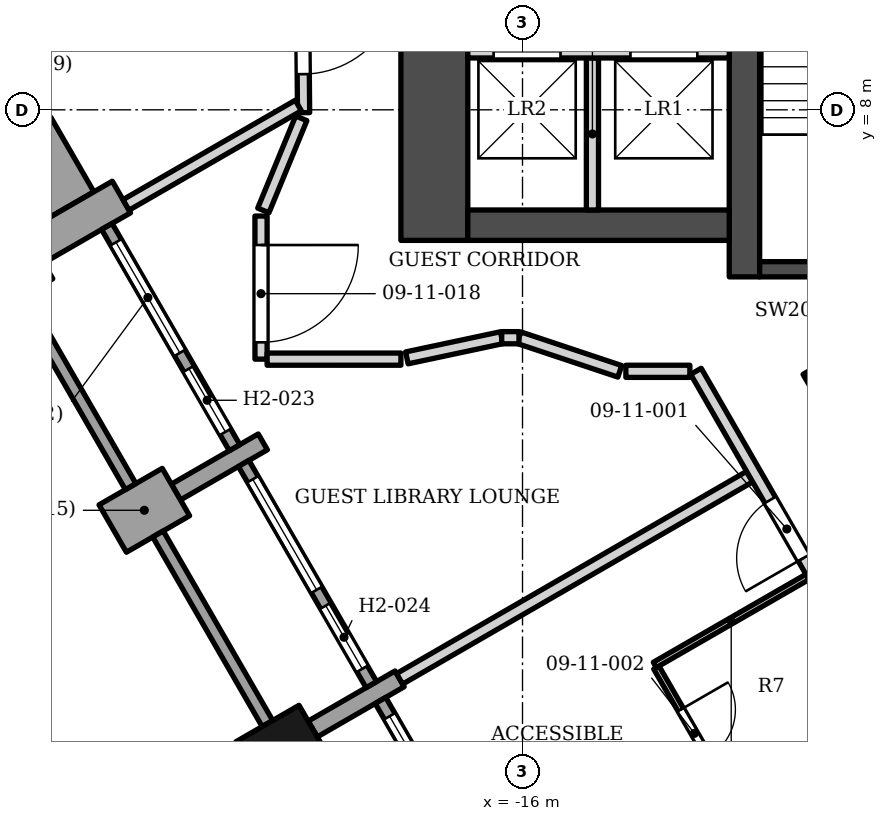
"""IFC4 building model, lengths in metres.
Left out: names, types, materials, properties, quantities, classifications, styles, units other than length and angle.
Written with IfcOpenShell. Run it as: python <this file> out.ifc"""

import sys

from ifc_helpers import new_model, si_unit, direction, frame, frame_2d, origin, origin_2d, place, context, subcontext, project, spatial, rectangle, extrude, element, fill, save


model = new_model("IFC4")
c1 = context("Model", 3, precision=1e-05, world=origin(), true_north=direction((0.0, 1.0)))
c2 = subcontext(c1, "Body", "Model", "MODEL_VIEW")
j1 = project(units=[si_unit("LENGTHUNIT", "METRE"), si_unit("PLANEANGLEUNIT", "RADIAN")], contexts=[c1])
p1 = place(None, origin())
s1 = spatial("IfcSite", under=j1, at=p1, CompositionType="ELEMENT")
p2 = place(p1, origin())
s2 = spatial("IfcBuilding", under=s1, at=p2, CompositionType="ELEMENT")
p3 = place(p2, frame((0.0, 0.0, 56.2)))
s3 = spatial("IfcBuildingStorey", under=s2, at=p3, CompositionType="ELEMENT", Elevation=56.2)
p4 = place(p3, frame((-12.35, 5.253, 0.0), z_axis=(0.0, 0.0, 1.0), x_axis=(0.0, 1.0, 0.0)))
e1 = element("IfcWall", 1, at=p4, inside=s3, PredefinedType="SHEAR", context=c2, shape_type="SweptSolid", body=[
    extrude(rectangle(XDim=13.3, YDim=0.5, at=frame_2d((6.65, 0.0))), origin(), (0.0, 0.0, 1.0), 3.4),
])
p5 = place(p3, frame((-12.1, 5.378, 0.0), z_axis=(0.0, 0.0, 1.0), x_axis=(1.0, 0.0, 0.0)))
e2 = element("IfcWall", 2, at=p5, inside=s3, PredefinedType="SHEAR", context=c2, shape_type="SweptSolid", body=[
    extrude(rectangle(XDim=3.75, YDim=0.25, at=frame_2d((1.875, 0.0))), origin(), (0.0, 0.0, 1.0), 3.4),
])
p6 = place(p3, frame((-12.6, 6.103, 0.0), z_axis=(0.0, 0.0, 1.0), x_axis=(-1.0, 0.0, 0.0)))
e3 = element("IfcWall", 3, at=p6, inside=s3, PredefinedType="SHEAR", context=c2, shape_type="SweptSolid", body=[
    extrude(rectangle(XDim=4.3, YDim=0.5, at=frame_2d((2.15, 0.0))), origin(), (0.0, 0.0, 1.0), 3.4),
])
p7 = place(p3, frame((-17.45, 5.853, 0.0), z_axis=(0.0, 0.0, 1.0), x_axis=(0.0, 1.0, 0.0)))
e4 = element("IfcWall", 4, at=p7, inside=s3, PredefinedType="SHEAR", context=c2, shape_type="SweptSolid", body=[
    extrude(rectangle(XDim=13.2, YDim=1.1, at=frame_2d((6.6, 0.0))), origin(), (0.0, 0.0, 1.0), 3.4),
])
p8 = place(p7, frame((4.1, 0.0, 0.0)))
e5 = element("IfcOpeningElement", 5, at=p8, cuts=e4, PredefinedType="OPENING", context=c2, shape_type="SweptSolid", body=[
    extrude(rectangle(XDim=1.6, YDim=2.1, at=frame_2d((0.8, 1.05))), frame((0.0, 0.56, 0.0), z_axis=(0.0, -1.0, 0.0), x_axis=(1.0, 0.0, 0.0)), (0.0, 0.0, 1.0), 1.12),
])
p9 = place(p7, frame((9.75, 0.0, 0.0)))
e6 = element("IfcOpeningElement", 6, at=p9, cuts=e4, PredefinedType="OPENING", context=c2, shape_type="SweptSolid", body=[
    extrude(rectangle(XDim=0.9, YDim=2.1, at=frame_2d((0.45, 1.05))), frame((0.0, 0.56, 0.0), z_axis=(0.0, -1.0, 0.0), x_axis=(1.0, 0.0, 0.0)), (0.0, 0.0, 1.0), 1.12),
])
for number, where, z_axis, x_axis in (
    (7, (-24.47, 5.311, 0.0), (0.0, 0.0, 1.0), (0.5, -0.866, 0.0)),
    (8, (-19.97, -2.483, 0.0), (0.0, 0.0, 1.0), (0.5, -0.866, 0.0)),
):
    element("IfcColumn", number, at=place(p3, frame(where, z_axis=z_axis, x_axis=x_axis)), inside=s3, PredefinedType="COLUMN", context=c2, shape_type="SweptSolid", body=[
        extrude(rectangle(XDim=0.9, YDim=1.2, at=origin_2d()), origin(), (0.0, 0.0, 1.0), 3.4),
    ])
p10 = place(p3, frame((-22.596, 6.566, 0.0), z_axis=(0.0, 0.0, 1.0), x_axis=(-0.866040211805, -0.499974350878, 0.0)))
e9 = element("IfcWall", 9, at=p10, inside=s3, PredefinedType="SOLIDWALL", context=c2, shape_type="SweptSolid", body=[
    extrude(rectangle(XDim=1.65, YDim=0.6, at=frame_2d((0.825, 0.0))), origin(), (0.0, 0.0, 1.0), 2.45),
])
p11 = place(p3, frame((-22.739, 1.114, 0.0), z_axis=(0.0, 0.0, 1.0), x_axis=(0.866043267704, 0.499969057507, 0.0)))
e10 = element("IfcWall", 10, at=p11, inside=s3, PredefinedType="SOLIDWALL", context=c2, shape_type="SweptSolid", body=[
    extrude(rectangle(XDim=1.2, YDim=0.9, at=frame_2d((0.6, 0.0))), origin(), (0.0, 0.0, 1.0), 2.63),
])
p12 = place(p3, frame((-20.271, 2.539, 0.0), z_axis=(0.0, 0.0, 1.0), x_axis=(-0.865976140824, -0.500085316245, 0.0)))
e11 = element("IfcWall", 11, at=p12, inside=s3, PredefinedType="SOLIDWALL", context=c2, shape_type="SweptSolid", body=[
    extrude(rectangle(XDim=1.65, YDim=0.3, at=frame_2d((0.825, 0.0))), origin(), (0.0, 0.0, 1.0), 2.65),
])
p13 = place(p3, frame((-18.021, -1.358, 0.0), z_axis=(0.0, 0.0, 1.0), x_axis=(-0.866040211805, -0.499974350878, 0.0)))
e12 = element("IfcWall", 12, at=p13, inside=s3, PredefinedType="SOLIDWALL", context=c2, shape_type="SweptSolid", body=[
    extrude(rectangle(XDim=1.65, YDim=0.3, at=frame_2d((0.825, 0.0))), origin(), (0.0, 0.0, 1.0), 2.628),
])
p14 = place(p3, frame((-24.245, 4.921, 0.0), z_axis=(0.0, 0.0, 1.0), x_axis=(0.499961193289, -0.866047807691, 0.0)))
e13 = element("IfcWall", 13, at=p14, inside=s3, PredefinedType="SOLIDWALL", context=c2, shape_type="SweptSolid", body=[
    extrude(rectangle(XDim=3.6, YDim=0.2, at=frame_2d((1.8, 0.0))), origin(), (0.0, 0.0, 1.0), 2.63),
])
p15 = place(p3, frame((-22.836, 6.081, 0.0), z_axis=(0.0, 0.0, 1.0), x_axis=(0.500002543286, -0.866023935413, 0.0)))
e14 = element("IfcWall", 14, at=p15, inside=s3, PredefinedType="ELEMENTEDWALL", context=c2, shape_type="SweptSolid", body=[
    extrude(rectangle(XDim=4.2, YDim=0.2, at=frame_2d((2.1, 0.0))), origin(), (0.0, 0.0, 1.0), 2.45),
])
p16 = place(p15, frame((0.3, 0.0, 0.6)))
e15 = element("IfcOpeningElement", 15, at=p16, cuts=e14, PredefinedType="OPENING", context=c2, shape_type="SweptSolid", body=[
    extrude(rectangle(XDim=2.1, YDim=1.75, at=frame_2d((1.05, 0.875))), frame((0.0, 0.11, 0.0), z_axis=(0.0, -1.0, 0.0), x_axis=(1.0, 0.0, 0.0)), (0.0, 0.0, 1.0), 0.22),
])
p17 = place(p15, frame((2.7, 0.0, 0.0)))
e16 = element("IfcOpeningElement", 16, at=p17, cuts=e14, PredefinedType="OPENING", context=c2, shape_type="SweptSolid", body=[
    extrude(rectangle(XDim=1.2, YDim=2.35, at=frame_2d((0.6, 1.175))), frame((0.0, 0.11, 0.0), z_axis=(0.0, -1.0, 0.0), x_axis=(1.0, 0.0, 0.0)), (0.0, 0.0, 1.0), 0.22),
])
p18 = place(p3, frame((-21.995, 1.024, 0.0), z_axis=(0.0, 0.0, 1.0), x_axis=(0.499961193289, -0.866047807691, 0.0)))
e17 = element("IfcWall", 17, at=p18, inside=s3, PredefinedType="SOLIDWALL", context=c2, shape_type="SweptSolid", body=[
    extrude(rectangle(XDim=3.6, YDim=0.2, at=frame_2d((1.8, 0.0))), origin(), (0.0, 0.0, 1.0), 2.63),
])
p19 = place(p3, frame((-20.586, 2.184, 0.0), z_axis=(0.0, 0.0, 1.0), x_axis=(0.500027713859, -0.866009402589, 0.0)))
e18 = element("IfcWall", 18, at=p19, inside=s3, PredefinedType="ELEMENTEDWALL", context=c2, shape_type="SweptSolid", body=[
    extrude(rectangle(XDim=4.2, YDim=0.2, at=frame_2d((2.1, 0.0))), origin(), (0.0, 0.0, 1.0), 2.65),
])
p20 = place(p19, frame((0.3, 0.0, 0.6)))
e19 = element("IfcOpeningElement", 19, at=p20, cuts=e18, PredefinedType="OPENING", context=c2, shape_type="SweptSolid", body=[
    extrude(rectangle(XDim=2.1, YDim=1.8, at=frame_2d((1.05, 0.9))), frame((0.0, 0.11, 0.0), z_axis=(0.0, -1.0, 0.0), x_axis=(1.0, 0.0, 0.0)), (0.0, 0.0, 1.0), 0.22),
])
p21 = place(p19, frame((2.7, 0.0, 0.0)))
e20 = element("IfcOpeningElement", 20, at=p21, cuts=e18, PredefinedType="OPENING", context=c2, shape_type="SweptSolid", body=[
    extrude(rectangle(XDim=1.2, YDim=2.4, at=frame_2d((0.6, 1.2))), frame((0.0, 0.11, 0.0), z_axis=(0.0, -1.0, 0.0), x_axis=(1.0, 0.0, 0.0)), (0.0, 0.0, 1.0), 0.22),
])
p22 = place(p3, frame((-18.336, -1.713, 0.0), z_axis=(0.0, 0.0, 1.0), x_axis=(0.500027713859, -0.866009402589, 0.0)))
e21 = element("IfcWall", 21, at=p22, inside=s3, PredefinedType="ELEMENTEDWALL", context=c2, shape_type="SweptSolid", body=[
    extrude(rectangle(XDim=4.2, YDim=0.2, at=frame_2d((2.1, 0.0))), origin(), (0.0, 0.0, 1.0), 2.628),
])
p23 = place(p22, frame((0.3, 0.0, 0.6)))
e22 = element("IfcOpeningElement", 22, at=p23, cuts=e21, PredefinedType="OPENING", context=c2, shape_type="SweptSolid", body=[
    extrude(rectangle(XDim=2.1, YDim=1.8, at=frame_2d((1.05, 0.9))), frame((0.0, 0.11, 0.0), z_axis=(0.0, -1.0, 0.0), x_axis=(1.0, 0.0, 0.0)), (0.0, 0.0, 1.0), 0.22),
])
p24 = place(p22, frame((2.7, 0.0, 0.0)))
e23 = element("IfcOpeningElement", 23, at=p24, cuts=e21, PredefinedType="OPENING", context=c2, shape_type="SweptSolid", body=[
    extrude(rectangle(XDim=1.2, YDim=2.4, at=frame_2d((0.6, 1.2))), frame((0.0, 0.11, 0.0), z_axis=(0.0, -1.0, 0.0), x_axis=(1.0, 0.0, 0.0)), (0.0, 0.0, 1.0), 0.22),
])
p25 = place(p3, frame((-25.569, 6.014, 0.0), z_axis=(0.0, 0.0, 1.0), x_axis=(0.866022959057, 0.500004234368, 0.0)))
e24 = element("IfcWall", 24, at=p25, inside=s3, PredefinedType="SOLIDWALL", context=c2, shape_type="SweptSolid", body=[
    extrude(rectangle(XDim=2.5, YDim=1.417, at=frame_2d((1.25, 0.0))), origin(), (0.0, 0.0, 1.0), 2.63),
])
p26 = place(p3, frame((-14.85, 6.353, 0.0), z_axis=(0.0, 0.0, 1.0), x_axis=(0.0, 1.0, 0.0)))
e25 = element("IfcWall", 25, at=p26, inside=s3, PredefinedType="SOLIDWALL", context=c2, shape_type="SweptSolid", body=[
    extrude(rectangle(XDim=2.5, YDim=0.2, at=frame_2d((1.25, 0.0))), origin(), (0.0, 0.0, 1.0), 3.23),
])
p27 = place(p3, frame((-16.9, 8.953, 0.0), z_axis=(0.0, 0.0, 1.0), x_axis=(1.0, 0.0, 0.0)))
e26 = element("IfcWall", 26, at=p27, inside=s3, PredefinedType="SOLIDWALL", context=c2, shape_type="SweptSolid", body=[
    extrude(rectangle(XDim=4.3, YDim=0.2, at=frame_2d((2.15, 0.0))), origin(), (0.0, 0.0, 1.0), 3.23),
])
p28 = place(p27, frame((2.675, 0.0, 0.0)))
e27 = element("IfcOpeningElement", 27, at=p28, cuts=e26, PredefinedType="OPENING", context=c2, shape_type="SweptSolid", body=[
    extrude(rectangle(XDim=1.1, YDim=2.1, at=frame_2d((0.55, 1.05))), frame((0.0, 0.11, 0.0), z_axis=(0.0, -1.0, 0.0), x_axis=(1.0, 0.0, 0.0)), (0.0, 0.0, 1.0), 0.22),
])
p29 = place(p27, frame((0.425, 0.0, 0.0)))
e28 = element("IfcOpeningElement", 28, at=p29, cuts=e26, PredefinedType="OPENING", context=c2, shape_type="SweptSolid", body=[
    extrude(rectangle(XDim=1.1, YDim=2.1, at=frame_2d((0.55, 1.05))), frame((0.0, 0.11, 0.0), z_axis=(0.0, -1.0, 0.0), x_axis=(1.0, 0.0, 0.0)), (0.0, 0.0, 1.0), 0.22),
])
p30 = place(p3, frame((-15.771, -5.255, 0.0), z_axis=(0.0, 0.0, 1.0), x_axis=(0.866166026107, 0.499756355856, 0.0)))
e29 = element("IfcWall", 29, at=p30, inside=s3, PredefinedType="PARTITIONING", context=c2, shape_type="SweptSolid", body=[
    extrude(rectangle(XDim=6.65, YDim=0.2, at=frame_2d((3.325, 0.0))), origin(), (0.0, 0.0, 1.0), 2.384),
])
p31 = place(p3, frame((-18.021, -1.358, 0.0), z_axis=(0.0, 0.0, 1.0), x_axis=(0.865919508558, 0.500183371074, 0.0)))
e30 = element("IfcWall", 30, at=p31, inside=s3, PredefinedType="PARTITIONING", context=c2, shape_type="SweptSolid", body=[
    extrude(rectangle(XDim=6.648, YDim=0.2, at=frame_2d((3.324, 0.0))), origin(), (0.0, 0.0, 1.0), 2.384),
])
p32 = place(p3, frame((-13.799, -1.172, 0.0), z_axis=(0.0, 0.0, 1.0), x_axis=(0.500018594424, -0.866014668023, 0.0)))
e31 = element("IfcWall", 31, at=p32, inside=s3, PredefinedType="PARTITIONING", context=c2, shape_type="SweptSolid", body=[
    extrude(rectangle(XDim=2.45, YDim=0.1, at=frame_2d((1.225, 0.0))), origin(), (0.0, 0.0, 1.0), 2.384),
])
p33 = place(p32, frame((0.8, 0.0, 0.0)))
e32 = element("IfcOpeningElement", 32, at=p33, cuts=e31, PredefinedType="OPENING", context=c2, shape_type="SweptSolid", body=[
    extrude(rectangle(XDim=0.9, YDim=2.1, at=frame_2d((0.45, 1.05))), frame((0.0, 0.06, 0.0), z_axis=(0.0, -1.0, 0.0), x_axis=(1.0, 0.0, 0.0)), (0.0, 0.0, 1.0), 0.12),
])
p34 = place(p3, frame((-13.823, -1.129, 0.0), z_axis=(0.0, 0.0, 1.0), x_axis=(0.866314505181, 0.49949892704, 0.0)))
e33 = element("IfcWall", 33, at=p34, inside=s3, PredefinedType="PARTITIONING", context=c2, shape_type="SweptSolid", body=[
    extrude(rectangle(XDim=2.9, YDim=0.1, at=frame_2d((1.45, 0.0))), origin(), (0.0, 0.0, 1.0), 2.384),
])
p35 = place(p3, frame((-13.147, 3.699, 0.0), z_axis=(0.0, 0.0, 1.0), x_axis=(0.499337423021, -0.866407604982, 0.0)))
e34 = element("IfcWall", 34, at=p35, inside=s3, PredefinedType="PARTITIONING", context=c2, shape_type="SweptSolid", body=[
    extrude(rectangle(XDim=3.843, YDim=0.2, at=frame_2d((1.921, 0.0))), origin(), (0.0, 0.0, 1.0), 3.23),
])
p36 = place(p35, frame((2.443, 0.0, 0.0)))
e35 = element("IfcOpeningElement", 35, at=p36, cuts=e34, PredefinedType="OPENING", context=c2, shape_type="SweptSolid", body=[
    extrude(rectangle(XDim=1.1, YDim=2.1, at=frame_2d((0.55, 1.05))), frame((0.0, 0.11, 0.0), z_axis=(0.0, -1.0, 0.0), x_axis=(1.0, 0.0, 0.0)), (0.0, 0.0, 1.0), 0.22),
])
p37 = place(p3, frame((-16.058, 4.252, 0.0), z_axis=(0.0, 0.0, 1.0), x_axis=(0.948655351627, -0.316311592943, 0.0)))
e36 = element("IfcWall", 36, at=p37, inside=s3, PredefinedType="PARTITIONING", context=c2, shape_type="SweptSolid", body=[
    extrude(rectangle(XDim=1.747, YDim=0.2, at=frame_2d((0.874, 0.0))), origin(), (0.0, 0.0, 1.0), 3.23),
])
p38 = place(p3, frame((-14.3, 3.699, 0.0), z_axis=(0.0, 0.0, 1.0), x_axis=(1.0, 0.0, 0.0)))
e37 = element("IfcWall", 37, at=p38, inside=s3, PredefinedType="PARTITIONING", context=c2, shape_type="SweptSolid", body=[
    extrude(rectangle(XDim=1.052, YDim=0.2, at=frame_2d((0.526, 0.0))), origin(), (0.0, 0.0, 1.0), 2.384),
])
p39 = place(p3, frame((-11.299, 3.7, 0.0), z_axis=(0.0, 0.0, 1.0), x_axis=(0.500141073811, -0.86594393946, 0.0)))
e38 = element("IfcWall", 38, at=p39, inside=s3, PredefinedType="PARTITIONING", context=c2, shape_type="SweptSolid", body=[
    extrude(rectangle(XDim=22.733, YDim=0.2, at=frame_2d((11.367, 0.0))), origin(), (0.0, 0.0, 1.0), 2.374),
])
p40 = place(p39, frame((5.025, 0.0, 0.0)))
e39 = element("IfcOpeningElement", 39, at=p40, cuts=e38, PredefinedType="OPENING", context=c2, shape_type="SweptSolid", body=[
    extrude(rectangle(XDim=1.0, YDim=2.1, at=frame_2d((0.5, 1.05))), frame((0.0, 0.11, 0.0), z_axis=(0.0, -1.0, 0.0), x_axis=(1.0, 0.0, 0.0)), (0.0, 0.0, 1.0), 0.22),
])
p41 = place(p39, frame((14.647, 0.0, 0.0)))
e40 = element("IfcOpeningElement", 40, at=p41, cuts=e38, PredefinedType="OPENING", context=c2, shape_type="SweptSolid", body=[
    extrude(rectangle(XDim=1.0, YDim=2.1, at=frame_2d((0.5, 1.05))), frame((0.0, 0.11, 0.0), z_axis=(0.0, -1.0, 0.0), x_axis=(1.0, 0.0, 0.0)), (0.0, 0.0, 1.0), 0.22),
])
p42 = place(p3, frame((-20.301, 6.253, 0.0), z_axis=(0.0, 0.0, 1.0), x_axis=(0.000103755965, -0.999999994617, 0.0)))
e41 = element("IfcWall", 41, at=p42, inside=s3, PredefinedType="PARTITIONING", context=c2, shape_type="SweptSolid", body=[
    extrude(rectangle(XDim=2.353, YDim=0.2, at=frame_2d((1.177, 0.0))), origin(), (0.0, 0.0, 1.0), 2.45),
])
p43 = place(p42, frame((0.476, 0.0, 0.0)))
e42 = element("IfcOpeningElement", 42, at=p43, cuts=e41, PredefinedType="OPENING", context=c2, shape_type="SweptSolid", body=[
    extrude(rectangle(XDim=1.6, YDim=2.1, at=frame_2d((0.8, 1.05))), frame((0.0, 0.11, 0.0), z_axis=(0.0, -1.0, 0.0), x_axis=(1.0, 0.0, 0.0)), (0.0, 0.0, 1.0), 0.22),
])
p44 = place(p3, frame((-20.2, 3.9, 0.0), z_axis=(0.0, 0.0, 1.0), x_axis=(0.999999993844, -0.00011096316, 0.0)))
e43 = element("IfcWall", 43, at=p44, inside=s3, PredefinedType="PARTITIONING", context=c2, shape_type="SweptSolid", body=[
    extrude(rectangle(XDim=2.2, YDim=0.2, at=frame_2d((1.1, 0.0))), origin(), (0.0, 0.0, 1.0), 3.23),
])
p45 = place(p3, frame((-17.902, 3.92, 0.0), z_axis=(0.0, 0.0, 1.0), x_axis=(0.978117199083, 0.208054667953, 0.0)))
e44 = element("IfcWall", 44, at=p45, inside=s3, PredefinedType="PARTITIONING", context=c2, shape_type="SweptSolid", body=[
    extrude(rectangle(XDim=1.595, YDim=0.2, at=frame_2d((0.797, 0.0))), origin(), (0.0, 0.0, 1.0), 2.628),
])
p46 = place(p3, frame((-16.342, 4.252, 0.0), z_axis=(0.0, 0.0, 1.0), x_axis=(1.0, 0.0, 0.0)))
e45 = element("IfcWall", 45, at=p46, inside=s3, PredefinedType="PARTITIONING", context=c2, shape_type="SweptSolid", body=[
    extrude(rectangle(XDim=0.284, YDim=0.2, at=frame_2d((0.142, 0.0))), origin(), (0.0, 0.0, 1.0), 3.23),
])
p47 = place(p3, frame((-20.262, 6.345, 0.0), z_axis=(0.0, 0.0, 1.0), x_axis=(0.380749805254, 0.924678098475, 0.0)))
e46 = element("IfcWall", 46, at=p47, inside=s3, PredefinedType="PARTITIONING", context=c2, shape_type="SweptSolid", body=[
    extrude(rectangle(XDim=1.638, YDim=0.2, at=frame_2d((0.819, 0.0))), origin(), (0.0, 0.0, 1.0), 3.23),
])
p48 = place(p3, frame((-19.649, 13.452, 0.0), z_axis=(0.0, 0.0, 1.0), x_axis=(0.00887867333, -0.999960583803, 0.0)))
e47 = element("IfcWall", 47, at=p48, inside=s3, PredefinedType="PARTITIONING", context=c2, shape_type="SweptSolid", body=[
    extrude(rectangle(XDim=5.5, YDim=0.2, at=frame_2d((2.75, 0.0))), origin(), (0.0, 0.0, 1.0), 3.23),
])
p49 = place(p48, frame((3.266, 0.0, 0.0)))
e48 = element("IfcOpeningElement", 48, at=p49, cuts=e47, PredefinedType="OPENING", context=c2, shape_type="SweptSolid", body=[
    extrude(rectangle(XDim=1.6, YDim=2.1, at=frame_2d((0.8, 1.05))), frame((0.0, 0.11, 0.0), z_axis=(0.0, -1.0, 0.0), x_axis=(1.0, 0.0, 0.0)), (0.0, 0.0, 1.0), 0.22),
])
p50 = place(p48, frame((0.45, 0.0, 0.0)))
e49 = element("IfcOpeningElement", 49, at=p50, cuts=e47, PredefinedType="OPENING", context=c2, shape_type="SweptSolid", body=[
    extrude(rectangle(XDim=1.6, YDim=2.1, at=frame_2d((0.8, 1.05))), frame((0.0, 0.11, 0.0), z_axis=(0.0, -1.0, 0.0), x_axis=(1.0, 0.0, 0.0)), (0.0, 0.0, 1.0), 0.22),
])
p51 = place(p3, frame((-22.521, 6.436, 0.0), z_axis=(0.0, 0.0, 1.0), x_axis=(0.866279994271, 0.499558776848, 0.0)))
e50 = element("IfcWall", 50, at=p51, inside=s3, PredefinedType="PARTITIONING", context=c2, shape_type="SweptSolid", body=[
    extrude(rectangle(XDim=3.271, YDim=0.2, at=frame_2d((1.636, 0.0))), origin(), (0.0, 0.0, 1.0), 2.552),
])
p52 = place(p16, origin())
e51 = element("IfcWindow", 51, at=p52, inside=s3, PartitioningType="SINGLE_PANEL", PredefinedType="WINDOW", context=c2, shape_type="SweptSolid", body=[
    extrude(rectangle(XDim=2.1, YDim=1.75, at=frame_2d((1.05, 0.875))), frame((0.0, 0.03, 0.0), z_axis=(0.0, -1.0, 0.0), x_axis=(1.0, 0.0, 0.0)), (0.0, 0.0, 1.0), 0.06),
])
fill(e15, e51)
p53 = place(p17, origin())
e52 = element("IfcDoor", 52, at=p53, inside=s3, OperationType="SINGLE_SWING_LEFT", PredefinedType="DOOR", context=c2, shape_type="SweptSolid", body=[
    extrude(rectangle(XDim=1.2, YDim=2.35, at=frame_2d((0.6, 1.175))), frame((0.0, 0.025, 0.0), z_axis=(0.0, -1.0, 0.0), x_axis=(1.0, 0.0, 0.0)), (0.0, 0.0, 1.0), 0.05),
])
fill(e16, e52)
p54 = place(p20, origin())
e53 = element("IfcWindow", 53, at=p54, inside=s3, PartitioningType="SINGLE_PANEL", PredefinedType="WINDOW", context=c2, shape_type="SweptSolid", body=[
    extrude(rectangle(XDim=2.1, YDim=1.8, at=frame_2d((1.05, 0.9))), frame((0.0, 0.03, 0.0), z_axis=(0.0, -1.0, 0.0), x_axis=(1.0, 0.0, 0.0)), (0.0, 0.0, 1.0), 0.06),
])
fill(e19, e53)
p55 = place(p21, origin())
e54 = element("IfcDoor", 54, at=p55, inside=s3, OperationType="SINGLE_SWING_LEFT", PredefinedType="DOOR", context=c2, shape_type="SweptSolid", body=[
    extrude(rectangle(XDim=1.2, YDim=2.4, at=frame_2d((0.6, 1.2))), frame((0.0, 0.025, 0.0), z_axis=(0.0, -1.0, 0.0), x_axis=(1.0, 0.0, 0.0)), (0.0, 0.0, 1.0), 0.05),
])
fill(e20, e54)
p56 = place(p23, origin())
e55 = element("IfcWindow", 55, at=p56, inside=s3, PartitioningType="SINGLE_PANEL", PredefinedType="WINDOW", context=c2, shape_type="SweptSolid", body=[
    extrude(rectangle(XDim=2.1, YDim=1.8, at=frame_2d((1.05, 0.9))), frame((0.0, 0.03, 0.0), z_axis=(0.0, -1.0, 0.0), x_axis=(1.0, 0.0, 0.0)), (0.0, 0.0, 1.0), 0.06),
])
fill(e22, e55)
p57 = place(p28, origin())
e56 = element("IfcDoor", 56, at=p57, inside=s3, OperationType="DOUBLE_DOOR_SLIDING", PredefinedType="DOOR", context=c2, shape_type="SweptSolid", body=[
    extrude(rectangle(XDim=1.1, YDim=2.1, at=frame_2d((0.55, 1.05))), frame((0.0, 0.025, 0.0), z_axis=(0.0, -1.0, 0.0), x_axis=(1.0, 0.0, 0.0)), (0.0, 0.0, 1.0), 0.05),
])
fill(e27, e56)
p58 = place(p29, origin())
e57 = element("IfcDoor", 57, at=p58, inside=s3, OperationType="DOUBLE_DOOR_SLIDING", PredefinedType="DOOR", context=c2, shape_type="SweptSolid", body=[
    extrude(rectangle(XDim=1.1, YDim=2.1, at=frame_2d((0.55, 1.05))), frame((0.0, 0.025, 0.0), z_axis=(0.0, -1.0, 0.0), x_axis=(1.0, 0.0, 0.0)), (0.0, 0.0, 1.0), 0.05),
])
fill(e28, e57)
p59 = place(p36, origin())
e58 = element("IfcDoor", 58, at=p59, inside=s3, OperationType="SINGLE_SWING_RIGHT", PredefinedType="DOOR", context=c2, shape_type="SweptSolid", body=[
    extrude(rectangle(XDim=1.1, YDim=2.1, at=frame_2d((0.55, 1.05))), frame((0.0, 0.025, 0.0), z_axis=(0.0, -1.0, 0.0), x_axis=(1.0, 0.0, 0.0)), (0.0, 0.0, 1.0), 0.05),
])
fill(e35, e58)
p60 = place(p33, origin())
e59 = element("IfcDoor", 59, at=p60, inside=s3, OperationType="SINGLE_SWING_LEFT", PredefinedType="DOOR", context=c2, shape_type="SweptSolid", body=[
    extrude(rectangle(XDim=0.9, YDim=2.1, at=frame_2d((0.45, 1.05))), frame((0.0, 0.025, 0.0), z_axis=(0.0, -1.0, 0.0), x_axis=(1.0, 0.0, 0.0)), (0.0, 0.0, 1.0), 0.05),
])
fill(e32, e59)
p61 = place(p49, origin())
e60 = element("IfcDoor", 60, at=p61, inside=s3, OperationType="DOUBLE_DOOR_SINGLE_SWING", PredefinedType="DOOR", context=c2, shape_type="SweptSolid", body=[
    extrude(rectangle(XDim=1.6, YDim=2.1, at=frame_2d((0.8, 1.05))), frame((0.0, 0.025, 0.0), z_axis=(0.0, -1.0, 0.0), x_axis=(1.0, 0.0, 0.0)), (0.0, 0.0, 1.0), 0.05),
])
fill(e48, e60)
p62 = place(p43, origin())
e61 = element("IfcDoor", 61, at=p62, inside=s3, OperationType="DOUBLE_DOOR_SINGLE_SWING", PredefinedType="DOOR", context=c2, shape_type="SweptSolid", body=[
    extrude(rectangle(XDim=1.6, YDim=2.1, at=frame_2d((0.8, 1.05))), frame((0.0, 0.025, 0.0), z_axis=(0.0, -1.0, 0.0), x_axis=(1.0, 0.0, 0.0)), (0.0, 0.0, 1.0), 0.05),
])
fill(e42, e61)
save(model, sys.argv[1])
